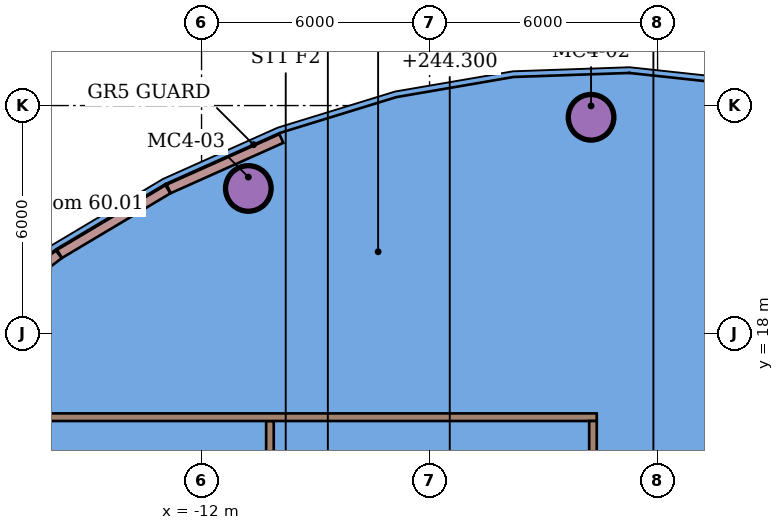
"""IFC4 building model, lengths in metres.
Left out: names, types, materials, properties, quantities, classifications, styles, units other than length and angle.
Written with IfcOpenShell. Run it as: python <this file> out.ifc"""

import sys

from ifc_helpers import new_model, si_unit, direction, frame, frame_2d, origin, origin_2d, place, context, subcontext, project, spatial, rectangle, hollow_circle, extrude, element, save


model = new_model("IFC4")
c1 = context("Model", 3, precision=1e-05, world=origin(), true_north=direction((0.0, 1.0)))
c2 = subcontext(c1, "Body", "Model", "MODEL_VIEW")
j1 = project(units=[si_unit("LENGTHUNIT", "METRE"), si_unit("PLANEANGLEUNIT", "RADIAN")], contexts=[c1])
p1 = place(None, origin())
s1 = spatial("IfcSite", under=j1, at=p1, CompositionType="ELEMENT")
p2 = place(p1, origin())
s2 = spatial("IfcBuilding", under=s1, at=p2, CompositionType="ELEMENT")
p3 = place(p2, frame((0.0, 0.0, 242.5)))
s3 = spatial("IfcBuildingStorey", under=s2, at=p3, CompositionType="ELEMENT", Elevation=242.5)
for number, where, z_axis, x_axis in (
    (1, (-1.75, 23.691, 0.0), (0.0, 0.0, 1.0), (1.0, 0.0, 0.0)),
    (2, (-10.769, 21.819, 0.0), (0.0, 0.0, 1.0), (1.0, 0.0, 0.0)),
):
    element("IfcColumn", number, at=place(p3, frame(where, z_axis=z_axis, x_axis=x_axis)), inside=s3, PredefinedType="COLUMN", context=c2, shape_type="SweptSolid", body=[
        extrude(hollow_circle(Radius=0.6, WallThickness=0.045, at=origin_2d()), origin(), (0.0, 0.0, 1.0), 3.4),
    ])
p4 = place(p3, frame((-10.2, 10.9, 0.0), z_axis=(0.0, 0.0, 1.0), x_axis=(0.0, 1.0, 0.0)))
e3 = element("IfcWall", 3, at=p4, inside=s3, PredefinedType="PARTITIONING", context=c2, shape_type="SweptSolid", body=[
    extrude(rectangle(XDim=4.8, YDim=0.2, at=frame_2d((2.4, 0.0))), origin(), (0.0, 0.0, 1.0), 3.4),
])
p5 = place(p3, frame((-19.3, 15.8, 0.0), z_axis=(0.0, 0.0, 1.0), x_axis=(1.0, 0.0, 0.0)))
e4 = element("IfcWall", 4, at=p5, inside=s3, PredefinedType="PARTITIONING", context=c2, shape_type="SweptSolid", body=[
    extrude(rectangle(XDim=17.7, YDim=0.2, at=frame_2d((8.85, 0.0))), origin(), (0.0, 0.0, 1.0), 3.4),
])
p6 = place(p3, frame((-1.7, 10.9, 0.0), z_axis=(0.0, 0.0, 1.0), x_axis=(0.0, 1.0, 0.0)))
e5 = element("IfcWall", 5, at=p6, inside=s3, PredefinedType="PARTITIONING", context=c2, shape_type="SweptSolid", body=[
    extrude(rectangle(XDim=4.8, YDim=0.2, at=frame_2d((2.4, 0.0))), origin(), (0.0, 0.0, 1.0), 3.4),
])
p7 = place(p3, frame((-9.9, 23.133, 0.0), z_axis=(0.0, 0.0, 1.0), x_axis=(-0.912863949032, -0.40826389818, 0.0)))
e6 = element("IfcWall", 6, at=p7, inside=s3, PredefinedType="SOLIDWALL", context=c2, shape_type="SweptSolid", body=[
    extrude(rectangle(XDim=3.249, YDim=0.25, at=frame_2d((1.625, 0.0))), origin(), (0.0, 0.0, 1.0), 3.05),
])
p8 = place(p3, frame((-12.886, 21.796, 0.0), z_axis=(0.0, 0.0, 1.0), x_axis=(-0.858982444498, -0.51200503908, 0.0)))
e7 = element("IfcWall", 7, at=p8, inside=s3, PredefinedType="SOLIDWALL", context=c2, shape_type="SweptSolid", body=[
    extrude(rectangle(XDim=3.318, YDim=0.25, at=frame_2d((1.659, 0.0))), origin(), (0.0, 0.0, 1.0), 3.05),
])
p9 = place(p3, frame((-15.754, 20.085, 0.0), z_axis=(0.0, 0.0, 1.0), x_axis=(-0.795944646333, -0.60536940786, 0.0)))
e8 = element("IfcWall", 8, at=p9, inside=s3, PredefinedType="SOLIDWALL", context=c2, shape_type="SweptSolid", body=[
    extrude(rectangle(XDim=3.374, YDim=0.25, at=frame_2d((1.687, 0.0))), origin(), (0.0, 0.0, 1.0), 3.05),
])
save(model, sys.argv[1])
